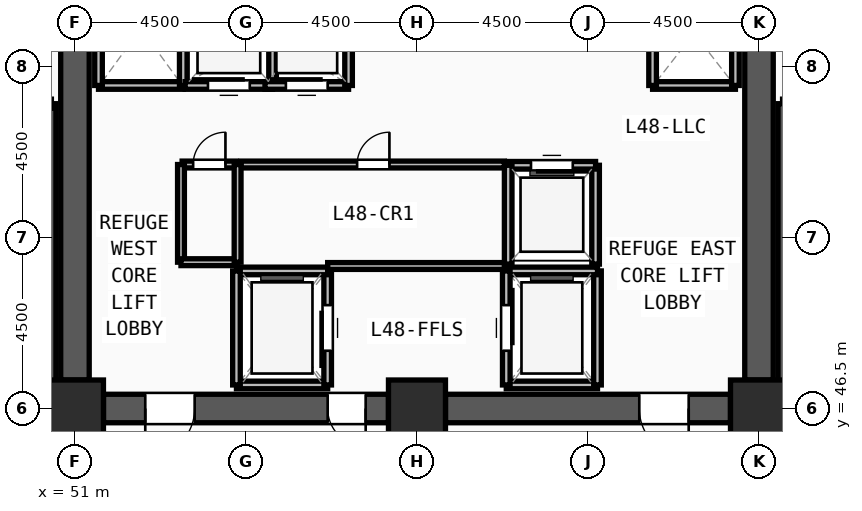
"""IFC4 building model, lengths in metres.
Left out: names, types, materials, properties, quantities, classifications, styles, units other than length and angle.
Written with IfcOpenShell. Run it as: python <this file> out.ifc"""

import sys

from ifc_helpers import new_model, si_unit, direction, frame, frame_2d, origin, origin_2d, place, context, subcontext, project, spatial, rectangle, extrude, source, transform, mapped, element, fill, save


model = new_model("IFC4")
c1 = context("Model", 3, precision=1e-05, world=origin(), true_north=direction((0.0, 1.0)))
c2 = subcontext(c1, "Body", "Model", "MODEL_VIEW")
j1 = project(units=[si_unit("LENGTHUNIT", "METRE"), si_unit("PLANEANGLEUNIT", "RADIAN")], contexts=[c1])
p1 = place(None, origin())
s1 = spatial("IfcSite", under=j1, at=p1, CompositionType="ELEMENT")
p2 = place(p1, origin())
s2 = spatial("IfcBuilding", under=s1, at=p2, CompositionType="ELEMENT")
p3 = place(p2, frame((0.0, 0.0, 185.25)))
s3 = spatial("IfcBuildingStorey", under=s2, at=p3, CompositionType="ELEMENT", Elevation=185.25)
m1 = source(origin(), c2, "Body", "SweptSolid", [
    extrude(rectangle(XDim=1.5, YDim=1.5, at=origin_2d()), origin(), (0.0, 0.0, 1.0), 4.5),
])
for number, where, z_axis, x_axis in (
    (1, (51.0, 46.5, 0.0), (0.0, 0.0, 1.0), (1.0, 0.0, 0.0)),
    (2, (60.0, 46.5, 0.0), (0.0, 0.0, 1.0), (1.0, 0.0, 0.0)),
    (3, (69.0, 46.5, 0.0), (0.0, 0.0, 1.0), (1.0, 0.0, 0.0)),
):
    element("IfcColumn", number, at=place(p3, frame(where, z_axis=z_axis, x_axis=x_axis)), inside=s3, PredefinedType="COLUMN", context=c2, shape_type="MappedRepresentation", body=[
        mapped(m1, transform((0.0, 0.0, 0.0), x_axis=(1.0, 0.0, 0.0), y_axis=(0.0, 1.0, 0.0), z_axis=(0.0, 0.0, 1.0), scale=1.0)),
    ])
p4 = place(p3, frame((69.0, 60.75, 0.0), z_axis=(0.0, 0.0, 1.0), x_axis=(0.0, -1.0, 0.0)))
e4 = element("IfcWall", 4, at=p4, inside=s3, PredefinedType="SHEAR", context=c2, shape_type="SweptSolid", body=[
    extrude(rectangle(XDim=13.5, YDim=0.75, at=frame_2d((6.75, 0.0))), origin(), (0.0, 0.0, 1.0), 4.22),
])
m2 = source(origin(), c2, "Body", "SweptSolid", [
    extrude(rectangle(XDim=1.2, YDim=2.2, at=frame_2d((0.6, 1.1))), frame((0.0, 0.385, 0.0), z_axis=(0.0, -1.0, 0.0), x_axis=(1.0, 0.0, 0.0)), (0.0, 0.0, 1.0), 0.77),
])
p5 = place(p4, frame((1.2, 0.0, 0.0)))
e5 = element("IfcOpeningElement", 5, at=p5, cuts=e4, PredefinedType="OPENING", context=c2, shape_type="MappedRepresentation", body=[
    mapped(m2, transform((0.0, 0.0, 0.0), x_axis=(1.0, 0.0, 0.0), y_axis=(0.0, 1.0, 0.0), z_axis=(0.0, 0.0, 1.0), scale=1.0)),
])
p6 = place(p3, frame((68.25, 46.5, 0.0), z_axis=(0.0, 0.0, 1.0), x_axis=(-1.0, 0.0, 0.0)))
e6 = element("IfcWall", 6, at=p6, inside=s3, PredefinedType="SHEAR", context=c2, shape_type="SweptSolid", body=[
    extrude(rectangle(XDim=7.5, YDim=0.75, at=frame_2d((3.75, 0.0))), origin(), (0.0, 0.0, 1.0), 4.22),
])
m3 = source(origin(), c2, "Body", "SweptSolid", [
    extrude(rectangle(XDim=1.3, YDim=2.2, at=frame_2d((0.65, 1.1))), frame((0.0, 0.385, 0.0), z_axis=(0.0, -1.0, 0.0), x_axis=(1.0, 0.0, 0.0)), (0.0, 0.0, 1.0), 0.77),
])
p7 = place(p6, frame((1.1, 0.0, 0.0)))
e7 = element("IfcOpeningElement", 7, at=p7, cuts=e6, PredefinedType="OPENING", context=c2, shape_type="MappedRepresentation", body=[
    mapped(m3, transform((0.0, 0.0, 0.0), x_axis=(1.0, 0.0, 0.0), y_axis=(0.0, 1.0, 0.0), z_axis=(0.0, 0.0, 1.0), scale=1.0)),
])
p8 = place(p3, frame((59.25, 46.5, 0.0), z_axis=(0.0, 0.0, 1.0), x_axis=(-1.0, 0.0, 0.0)))
e8 = element("IfcWall", 8, at=p8, inside=s3, PredefinedType="SHEAR", context=c2, shape_type="SweptSolid", body=[
    extrude(rectangle(XDim=7.5, YDim=0.75, at=frame_2d((3.75, 0.0))), origin(), (0.0, 0.0, 1.0), 4.22),
])
p9 = place(p8, frame((5.1, 0.0, 0.0)))
e9 = element("IfcOpeningElement", 9, at=p9, cuts=e8, PredefinedType="OPENING", context=c2, shape_type="MappedRepresentation", body=[
    mapped(m3, transform((0.0, 0.0, 0.0), x_axis=(1.0, 0.0, 0.0), y_axis=(0.0, 1.0, 0.0), z_axis=(0.0, 0.0, 1.0), scale=1.0)),
])
m4 = source(origin(), c2, "Body", "SweptSolid", [
    extrude(rectangle(XDim=1.0, YDim=2.2, at=frame_2d((0.5, 1.1))), frame((0.0, 0.385, 0.0), z_axis=(0.0, -1.0, 0.0), x_axis=(1.0, 0.0, 0.0)), (0.0, 0.0, 1.0), 0.77),
])
p10 = place(p8, frame((0.6, 0.0, 0.0)))
e10 = element("IfcOpeningElement", 10, at=p10, cuts=e8, PredefinedType="OPENING", context=c2, shape_type="MappedRepresentation", body=[
    mapped(m4, transform((0.0, 0.0, 0.0), x_axis=(1.0, 0.0, 0.0), y_axis=(0.0, 1.0, 0.0), z_axis=(0.0, 0.0, 1.0), scale=1.0)),
])
p11 = place(p3, frame((51.0, 47.25, 0.0), z_axis=(0.0, 0.0, 1.0), x_axis=(0.0, 1.0, 0.0)))
e11 = element("IfcWall", 11, at=p11, inside=s3, PredefinedType="SHEAR", context=c2, shape_type="SweptSolid", body=[
    extrude(rectangle(XDim=13.5, YDim=0.75, at=frame_2d((6.75, 0.0))), origin(), (0.0, 0.0, 1.0), 4.22),
])
for number, where, z_axis, x_axis in (
    (12, (50.38, 46.7, 0.0), (0.0, 0.0, 1.0), (0.0, 1.0, 0.0)),
    (13, (69.62, 54.52, 0.0), (0.0, 0.0, 1.0), (0.0, -1.0, 0.0)),
):
    element("IfcWall", number, at=place(p3, frame(where, z_axis=z_axis, x_axis=x_axis)), inside=s3, PredefinedType="SOLIDWALL", context=c2, shape_type="SweptSolid", body=[
        extrude(rectangle(XDim=7.82, YDim=0.24, at=frame_2d((3.91, 0.0))), origin(), (0.0, 0.0, 1.0), 4.22),
    ])
p12 = place(p3, frame((55.25, 47.12, 0.0), z_axis=(0.0, 0.0, 1.0), x_axis=(1.0, 0.0, 0.0)))
e14 = element("IfcWall", 14, at=p12, inside=s3, PredefinedType="SOLIDWALL", context=c2, shape_type="SweptSolid", body=[
    extrude(rectangle(XDim=2.4, YDim=0.2, at=frame_2d((1.2, 0.0))), origin(), (0.0, 0.0, 1.0), 4.22),
])
p13 = place(p3, frame((57.65, 47.12, 0.0), z_axis=(0.0, 0.0, 1.0), x_axis=(0.0, 1.0, 0.0)))
e15 = element("IfcWall", 15, at=p13, inside=s3, PredefinedType="SOLIDWALL", context=c2, shape_type="SweptSolid", body=[
    extrude(rectangle(XDim=3.0, YDim=0.2, at=frame_2d((1.5, 0.0))), origin(), (0.0, 0.0, 1.0), 4.22),
])
m5 = source(origin(), c2, "Body", "SweptSolid", [
    extrude(rectangle(XDim=1.2, YDim=2.3, at=frame_2d((0.6, 1.15))), frame((0.0, 0.11, 0.0), z_axis=(0.0, -1.0, 0.0), x_axis=(1.0, 0.0, 0.0)), (0.0, 0.0, 1.0), 0.22),
])
p14 = place(p13, frame((0.9, 0.0, 0.0)))
e16 = element("IfcOpeningElement", 16, at=p14, cuts=e15, PredefinedType="OPENING", context=c2, shape_type="MappedRepresentation", body=[
    mapped(m5, transform((0.0, 0.0, 0.0), x_axis=(1.0, 0.0, 0.0), y_axis=(0.0, 1.0, 0.0), z_axis=(0.0, 0.0, 1.0), scale=1.0)),
])
p15 = place(p3, frame((57.65, 50.12, 0.0), z_axis=(0.0, 0.0, 1.0), x_axis=(-1.0, 0.0, 0.0)))
e17 = element("IfcWall", 17, at=p15, inside=s3, PredefinedType="SOLIDWALL", context=c2, shape_type="SweptSolid", body=[
    extrude(rectangle(XDim=2.4, YDim=0.2, at=frame_2d((1.2, 0.0))), origin(), (0.0, 0.0, 1.0), 4.22),
])
p16 = place(p3, frame((55.25, 50.12, 0.0), z_axis=(0.0, 0.0, 1.0), x_axis=(0.0, -1.0, 0.0)))
e18 = element("IfcWall", 18, at=p16, inside=s3, PredefinedType="SOLIDWALL", context=c2, shape_type="SweptSolid", body=[
    extrude(rectangle(XDim=3.0, YDim=0.2, at=frame_2d((1.5, 0.0))), origin(), (0.0, 0.0, 1.0), 4.22),
])
p17 = place(p3, frame((62.35, 47.12, 0.0), z_axis=(0.0, 0.0, 1.0), x_axis=(1.0, 0.0, 0.0)))
e19 = element("IfcWall", 19, at=p17, inside=s3, PredefinedType="SOLIDWALL", context=c2, shape_type="SweptSolid", body=[
    extrude(rectangle(XDim=2.4, YDim=0.2, at=frame_2d((1.2, 0.0))), origin(), (0.0, 0.0, 1.0), 4.22),
])
p18 = place(p3, frame((64.75, 47.12, 0.0), z_axis=(0.0, 0.0, 1.0), x_axis=(0.0, 1.0, 0.0)))
e20 = element("IfcWall", 20, at=p18, inside=s3, PredefinedType="SOLIDWALL", context=c2, shape_type="SweptSolid", body=[
    extrude(rectangle(XDim=3.0, YDim=0.2, at=frame_2d((1.5, 0.0))), origin(), (0.0, 0.0, 1.0), 4.22),
])
p19 = place(p3, frame((64.75, 50.12, 0.0), z_axis=(0.0, 0.0, 1.0), x_axis=(-1.0, 0.0, 0.0)))
e21 = element("IfcWall", 21, at=p19, inside=s3, PredefinedType="SOLIDWALL", context=c2, shape_type="SweptSolid", body=[
    extrude(rectangle(XDim=2.4, YDim=0.2, at=frame_2d((1.2, 0.0))), origin(), (0.0, 0.0, 1.0), 4.22),
])
p20 = place(p3, frame((62.35, 50.12, 0.0), z_axis=(0.0, 0.0, 1.0), x_axis=(0.0, -1.0, 0.0)))
e22 = element("IfcWall", 22, at=p20, inside=s3, PredefinedType="SOLIDWALL", context=c2, shape_type="SweptSolid", body=[
    extrude(rectangle(XDim=3.0, YDim=0.2, at=frame_2d((1.5, 0.0))), origin(), (0.0, 0.0, 1.0), 4.22),
])
p21 = place(p20, frame((0.9, 0.0, 0.0)))
e23 = element("IfcOpeningElement", 23, at=p21, cuts=e22, PredefinedType="OPENING", context=c2, shape_type="MappedRepresentation", body=[
    mapped(m5, transform((0.0, 0.0, 0.0), x_axis=(1.0, 0.0, 0.0), y_axis=(0.0, 1.0, 0.0), z_axis=(0.0, 0.0, 1.0), scale=1.0)),
])
p22 = place(p3, frame((51.62, 55.0, 0.0), z_axis=(0.0, 0.0, 1.0), x_axis=(1.0, 0.0, 0.0)))
e24 = element("IfcWall", 24, at=p22, inside=s3, PredefinedType="SOLIDWALL", context=c2, shape_type="SweptSolid", body=[
    extrude(rectangle(XDim=2.23, YDim=0.2, at=frame_2d((1.115, 0.0))), origin(), (0.0, 0.0, 1.0), 4.22),
])
for number, where, z_axis, x_axis in (
    (25, (53.85, 55.0, 0.0), (0.0, 0.0, 1.0), (0.0, 1.0, 0.0)),
    (26, (51.62, 58.0, 0.0), (0.0, 0.0, 1.0), (0.0, -1.0, 0.0)),
):
    element("IfcWall", number, at=place(p3, frame(where, z_axis=z_axis, x_axis=x_axis)), inside=s3, PredefinedType="SOLIDWALL", context=c2, shape_type="SweptSolid", body=[
        extrude(rectangle(XDim=3.0, YDim=0.2, at=frame_2d((1.5, 0.0))), origin(), (0.0, 0.0, 1.0), 4.22),
    ])
p23 = place(p3, frame((66.2, 55.0, 0.0), z_axis=(0.0, 0.0, 1.0), x_axis=(1.0, 0.0, 0.0)))
e27 = element("IfcWall", 27, at=p23, inside=s3, PredefinedType="SOLIDWALL", context=c2, shape_type="SweptSolid", body=[
    extrude(rectangle(XDim=2.18, YDim=0.2, at=frame_2d((1.09, 0.0))), origin(), (0.0, 0.0, 1.0), 4.22),
])
for number, where, z_axis, x_axis in (
    (28, (68.38, 55.0, 0.0), (0.0, 0.0, 1.0), (0.0, 1.0, 0.0)),
    (29, (66.2, 57.75, 0.0), (0.0, 0.0, 1.0), (0.0, -1.0, 0.0)),
):
    element("IfcWall", number, at=place(p3, frame(where, z_axis=z_axis, x_axis=x_axis)), inside=s3, PredefinedType="SOLIDWALL", context=c2, shape_type="SweptSolid", body=[
        extrude(rectangle(XDim=2.75, YDim=0.2, at=frame_2d((1.375, 0.0))), origin(), (0.0, 0.0, 1.0), 4.22),
    ])
p24 = place(p3, frame((64.7, 50.3, 0.0), z_axis=(0.0, 0.0, 1.0), x_axis=(0.0, 1.0, 0.0)))
e30 = element("IfcWall", 30, at=p24, inside=s3, PredefinedType="SOLIDWALL", context=c2, shape_type="SweptSolid", body=[
    extrude(rectangle(XDim=2.6, YDim=0.2, at=frame_2d((1.3, 0.0))), origin(), (0.0, 0.0, 1.0), 4.22),
])
p25 = place(p3, frame((64.7, 52.9, 0.0), z_axis=(0.0, 0.0, 1.0), x_axis=(-1.0, 0.0, 0.0)))
e31 = element("IfcWall", 31, at=p25, inside=s3, PredefinedType="SOLIDWALL", context=c2, shape_type="SweptSolid", body=[
    extrude(rectangle(XDim=2.3, YDim=0.2, at=frame_2d((1.15, 0.0))), origin(), (0.0, 0.0, 1.0), 4.22),
])
m6 = source(origin(), c2, "Body", "SweptSolid", [
    extrude(rectangle(XDim=1.1, YDim=2.2, at=frame_2d((0.55, 1.1))), frame((0.0, 0.11, 0.0), z_axis=(0.0, -1.0, 0.0), x_axis=(1.0, 0.0, 0.0)), (0.0, 0.0, 1.0), 0.22),
])
p26 = place(p25, frame((0.6, 0.0, 0.0)))
e32 = element("IfcOpeningElement", 32, at=p26, cuts=e31, PredefinedType="OPENING", context=c2, shape_type="MappedRepresentation", body=[
    mapped(m6, transform((0.0, 0.0, 0.0), x_axis=(1.0, 0.0, 0.0), y_axis=(0.0, 1.0, 0.0), z_axis=(0.0, 0.0, 1.0), scale=1.0)),
])
p27 = place(p3, frame((62.4, 52.9, 0.0), z_axis=(0.0, 0.0, 1.0), x_axis=(0.0, -1.0, 0.0)))
e33 = element("IfcWall", 33, at=p27, inside=s3, PredefinedType="SOLIDWALL", context=c2, shape_type="SweptSolid", body=[
    extrude(rectangle(XDim=2.6, YDim=0.2, at=frame_2d((1.3, 0.0))), origin(), (0.0, 0.0, 1.0), 4.22),
])
p28 = place(p3, frame((53.9, 55.0, 0.0), z_axis=(0.0, 0.0, 1.0), x_axis=(1.0, 0.0, 0.0)))
e34 = element("IfcWall", 34, at=p28, inside=s3, PredefinedType="SOLIDWALL", context=c2, shape_type="SweptSolid", body=[
    extrude(rectangle(XDim=2.3, YDim=0.2, at=frame_2d((1.15, 0.0))), origin(), (0.0, 0.0, 1.0), 4.22),
])
p29 = place(p28, frame((0.6, 0.0, 0.0)))
e35 = element("IfcOpeningElement", 35, at=p29, cuts=e34, PredefinedType="OPENING", context=c2, shape_type="MappedRepresentation", body=[
    mapped(m6, transform((0.0, 0.0, 0.0), x_axis=(1.0, 0.0, 0.0), y_axis=(0.0, 1.0, 0.0), z_axis=(0.0, 0.0, 1.0), scale=1.0)),
])
p30 = place(p3, frame((56.2, 55.0, 0.0), z_axis=(0.0, 0.0, 1.0), x_axis=(0.0, 1.0, 0.0)))
e36 = element("IfcWall", 36, at=p30, inside=s3, PredefinedType="SOLIDWALL", context=c2, shape_type="SweptSolid", body=[
    extrude(rectangle(XDim=2.6, YDim=0.2, at=frame_2d((1.3, 0.0))), origin(), (0.0, 0.0, 1.0), 4.22),
])
p31 = place(p3, frame((56.0, 55.0, 0.0), z_axis=(0.0, 0.0, 1.0), x_axis=(1.0, 0.0, 0.0)))
e37 = element("IfcWall", 37, at=p31, inside=s3, PredefinedType="SOLIDWALL", context=c2, shape_type="SweptSolid", body=[
    extrude(rectangle(XDim=2.2, YDim=0.2, at=frame_2d((1.1, 0.0))), origin(), (0.0, 0.0, 1.0), 4.22),
])
p32 = place(p31, frame((0.55, 0.0, 0.0)))
e38 = element("IfcOpeningElement", 38, at=p32, cuts=e37, PredefinedType="OPENING", context=c2, shape_type="MappedRepresentation", body=[
    mapped(m6, transform((0.0, 0.0, 0.0), x_axis=(1.0, 0.0, 0.0), y_axis=(0.0, 1.0, 0.0), z_axis=(0.0, 0.0, 1.0), scale=1.0)),
])
p33 = place(p3, frame((58.2, 55.0, 0.0), z_axis=(0.0, 0.0, 1.0), x_axis=(0.0, 1.0, 0.0)))
e39 = element("IfcWall", 39, at=p33, inside=s3, PredefinedType="SOLIDWALL", context=c2, shape_type="SweptSolid", body=[
    extrude(rectangle(XDim=2.6, YDim=0.2, at=frame_2d((1.3, 0.0))), origin(), (0.0, 0.0, 1.0), 4.22),
])
p34 = place(p3, frame((55.37, 52.92, 0.0), z_axis=(0.0, 0.0, 1.0), x_axis=(1.0, 0.0, 0.0)))
e40 = element("IfcWall", 40, at=p34, inside=s3, PredefinedType="PARTITIONING", context=c2, shape_type="SweptSolid", body=[
    extrude(rectangle(XDim=6.93, YDim=0.18, at=frame_2d((3.465, 0.0))), origin(), (0.0, 0.0, 1.0), 4.22),
])
m7 = source(origin(), c2, "Body", "SweptSolid", [
    extrude(rectangle(XDim=0.85, YDim=2.1, at=frame_2d((0.425, 1.05))), frame((0.0, 0.1, 0.0), z_axis=(0.0, -1.0, 0.0), x_axis=(1.0, 0.0, 0.0)), (0.0, 0.0, 1.0), 0.2),
])
p35 = place(p34, frame((3.055, 0.0, 0.0)))
e41 = element("IfcOpeningElement", 41, at=p35, cuts=e40, PredefinedType="OPENING", context=c2, shape_type="MappedRepresentation", body=[
    mapped(m7, transform((0.0, 0.0, 0.0), x_axis=(1.0, 0.0, 0.0), y_axis=(0.0, 1.0, 0.0), z_axis=(0.0, 0.0, 1.0), scale=1.0)),
])
p36 = place(p3, frame((53.82, 52.92, 0.0), z_axis=(0.0, 0.0, 1.0), x_axis=(1.0, 0.0, 0.0)))
e42 = element("IfcWall", 42, at=p36, inside=s3, PredefinedType="PARTITIONING", context=c2, shape_type="SweptSolid", body=[
    extrude(rectangle(XDim=1.43, YDim=0.18, at=frame_2d((0.715, 0.0))), origin(), (0.0, 0.0, 1.0), 4.22),
])
p37 = place(p36, frame((0.29, 0.0, 0.0)))
e43 = element("IfcOpeningElement", 43, at=p37, cuts=e42, PredefinedType="OPENING", context=c2, shape_type="MappedRepresentation", body=[
    mapped(m7, transform((0.0, 0.0, 0.0), x_axis=(1.0, 0.0, 0.0), y_axis=(0.0, 1.0, 0.0), z_axis=(0.0, 0.0, 1.0), scale=1.0)),
])
p38 = place(p3, frame((53.79, 50.35, 0.0), z_axis=(0.0, 0.0, 1.0), x_axis=(0.0, 1.0, 0.0)))
e44 = element("IfcWall", 44, at=p38, inside=s3, PredefinedType="PARTITIONING", context=c2, shape_type="SweptSolid", body=[
    extrude(rectangle(XDim=2.57, YDim=0.18, at=frame_2d((1.285, 0.0))), origin(), (0.0, 0.0, 1.0), 4.22),
])
p39 = place(p3, frame((53.79, 50.35, 0.0), z_axis=(0.0, 0.0, 1.0), x_axis=(1.0, 0.0, 0.0)))
e45 = element("IfcWall", 45, at=p39, inside=s3, PredefinedType="PARTITIONING", context=c2, shape_type="SweptSolid", body=[
    extrude(rectangle(XDim=1.49, YDim=0.18, at=frame_2d((0.745, 0.0))), origin(), (0.0, 0.0, 1.0), 4.22),
])
p40 = place(p3, frame((55.28, 50.35, 0.0), z_axis=(0.0, 0.0, 1.0), x_axis=(0.0, 1.0, 0.0)))
e46 = element("IfcWall", 46, at=p40, inside=s3, PredefinedType="PARTITIONING", context=c2, shape_type="SweptSolid", body=[
    extrude(rectangle(XDim=2.57, YDim=0.18, at=frame_2d((1.285, 0.0))), origin(), (0.0, 0.0, 1.0), 4.22),
])
p41 = place(p3, frame((57.65, 50.25, 0.0), z_axis=(0.0, 0.0, 1.0), x_axis=(1.0, 0.0, 0.0)))
e47 = element("IfcWall", 47, at=p41, inside=s3, PredefinedType="PARTITIONING", context=c2, shape_type="SweptSolid", body=[
    extrude(rectangle(XDim=4.65, YDim=0.18, at=frame_2d((2.325, 0.0))), origin(), (0.0, 0.0, 1.0), 4.22),
])
m8 = source(origin(), c2, "Body", "SweptSolid", [
    extrude(rectangle(XDim=1.3, YDim=2.2, at=frame_2d((0.65, 1.1))), frame((0.0, 0.025, 0.0), z_axis=(0.0, -1.0, 0.0), x_axis=(1.0, 0.0, 0.0)), (0.0, 0.0, 1.0), 0.05),
])
p42 = place(p9, origin())
e48 = element("IfcDoor", 48, at=p42, inside=s3, OperationType="SINGLE_SWING_RIGHT", PredefinedType="DOOR", context=c2, shape_type="MappedRepresentation", body=[
    mapped(m8, transform((0.0, 0.0, 0.0), x_axis=(1.0, 0.0, 0.0), y_axis=(0.0, 1.0, 0.0), z_axis=(0.0, 0.0, 1.0), scale=1.0)),
])
fill(e9, e48)
m9 = source(origin(), c2, "Body", "SweptSolid", [
    extrude(rectangle(XDim=1.0, YDim=2.2, at=frame_2d((0.5, 1.1))), frame((0.0, 0.025, 0.0), z_axis=(0.0, -1.0, 0.0), x_axis=(1.0, 0.0, 0.0)), (0.0, 0.0, 1.0), 0.05),
])
p43 = place(p10, origin())
e49 = element("IfcDoor", 49, at=p43, inside=s3, OperationType="SINGLE_SWING_LEFT", PredefinedType="DOOR", context=c2, shape_type="MappedRepresentation", body=[
    mapped(m9, transform((0.0, 0.0, 0.0), x_axis=(1.0, 0.0, 0.0), y_axis=(0.0, 1.0, 0.0), z_axis=(0.0, 0.0, 1.0), scale=1.0)),
])
fill(e10, e49)
p44 = place(p7, origin())
e50 = element("IfcDoor", 50, at=p44, inside=s3, OperationType="SINGLE_SWING_LEFT", PredefinedType="DOOR", context=c2, shape_type="MappedRepresentation", body=[
    mapped(m8, transform((0.0, 0.0, 0.0), x_axis=(1.0, 0.0, 0.0), y_axis=(0.0, 1.0, 0.0), z_axis=(0.0, 0.0, 1.0), scale=1.0)),
])
fill(e7, e50)
m10 = source(origin(), c2, "Body", "SweptSolid", [
    extrude(rectangle(XDim=1.2, YDim=2.3, at=frame_2d((0.6, 1.15))), frame((0.0, 0.025, 0.0), z_axis=(0.0, -1.0, 0.0), x_axis=(1.0, 0.0, 0.0)), (0.0, 0.0, 1.0), 0.05),
])
p45 = place(p14, origin())
e51 = element("IfcDoor", 51, at=p45, inside=s3, OperationType="SLIDING_TO_LEFT", PredefinedType="DOOR", context=c2, shape_type="MappedRepresentation", body=[
    mapped(m10, transform((0.0, 0.0, 0.0), x_axis=(1.0, 0.0, 0.0), y_axis=(0.0, 1.0, 0.0), z_axis=(0.0, 0.0, 1.0), scale=1.0)),
])
fill(e16, e51)
p46 = place(p21, origin())
e52 = element("IfcDoor", 52, at=p46, inside=s3, OperationType="SLIDING_TO_LEFT", PredefinedType="DOOR", context=c2, shape_type="MappedRepresentation", body=[
    mapped(m10, transform((0.0, 0.0, 0.0), x_axis=(1.0, 0.0, 0.0), y_axis=(0.0, 1.0, 0.0), z_axis=(0.0, 0.0, 1.0), scale=1.0)),
])
fill(e23, e52)
m11 = source(origin(), c2, "Body", "SweptSolid", [
    extrude(rectangle(XDim=1.1, YDim=2.2, at=frame_2d((0.55, 1.1))), frame((0.0, 0.025, 0.0), z_axis=(0.0, -1.0, 0.0), x_axis=(1.0, 0.0, 0.0)), (0.0, 0.0, 1.0), 0.05),
])
p47 = place(p26, origin())
e53 = element("IfcDoor", 53, at=p47, inside=s3, OperationType="SLIDING_TO_LEFT", PredefinedType="DOOR", context=c2, shape_type="MappedRepresentation", body=[
    mapped(m11, transform((0.0, 0.0, 0.0), x_axis=(1.0, 0.0, 0.0), y_axis=(0.0, 1.0, 0.0), z_axis=(0.0, 0.0, 1.0), scale=1.0)),
])
fill(e32, e53)
p48 = place(p29, origin())
e54 = element("IfcDoor", 54, at=p48, inside=s3, OperationType="SLIDING_TO_LEFT", PredefinedType="DOOR", context=c2, shape_type="MappedRepresentation", body=[
    mapped(m11, transform((0.0, 0.0, 0.0), x_axis=(1.0, 0.0, 0.0), y_axis=(0.0, 1.0, 0.0), z_axis=(0.0, 0.0, 1.0), scale=1.0)),
])
fill(e35, e54)
p49 = place(p32, origin())
e55 = element("IfcDoor", 55, at=p49, inside=s3, OperationType="SLIDING_TO_LEFT", PredefinedType="DOOR", context=c2, shape_type="MappedRepresentation", body=[
    mapped(m11, transform((0.0, 0.0, 0.0), x_axis=(1.0, 0.0, 0.0), y_axis=(0.0, 1.0, 0.0), z_axis=(0.0, 0.0, 1.0), scale=1.0)),
])
fill(e38, e55)
m12 = source(origin(), c2, "Body", "SweptSolid", [
    extrude(rectangle(XDim=0.85, YDim=2.1, at=frame_2d((0.425, 1.05))), frame((0.0, 0.025, 0.0), z_axis=(0.0, -1.0, 0.0), x_axis=(1.0, 0.0, 0.0)), (0.0, 0.0, 1.0), 0.05),
])
p50 = place(p35, origin())
e56 = element("IfcDoor", 56, at=p50, inside=s3, OperationType="SINGLE_SWING_RIGHT", PredefinedType="DOOR", context=c2, shape_type="MappedRepresentation", body=[
    mapped(m12, transform((0.0, 0.0, 0.0), x_axis=(1.0, 0.0, 0.0), y_axis=(0.0, 1.0, 0.0), z_axis=(0.0, 0.0, 1.0), scale=1.0)),
])
fill(e41, e56)
p51 = place(p37, origin())
e57 = element("IfcDoor", 57, at=p51, inside=s3, OperationType="SINGLE_SWING_RIGHT", PredefinedType="DOOR", context=c2, shape_type="MappedRepresentation", body=[
    mapped(m12, transform((0.0, 0.0, 0.0), x_axis=(1.0, 0.0, 0.0), y_axis=(0.0, 1.0, 0.0), z_axis=(0.0, 0.0, 1.0), scale=1.0)),
])
fill(e43, e57)
save(model, sys.argv[1])
